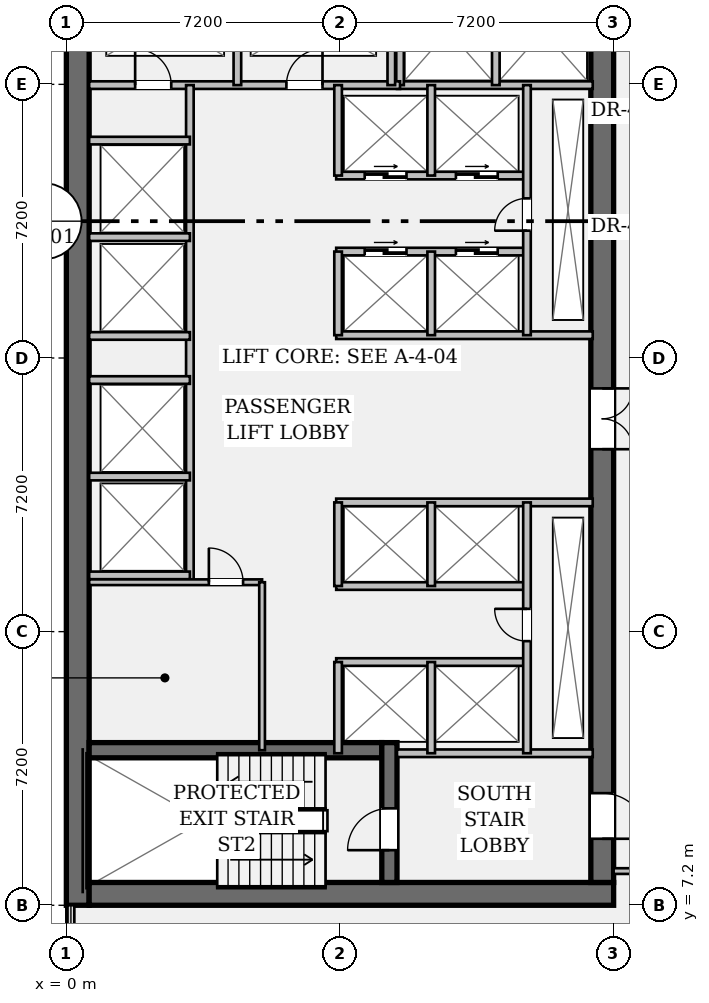
"""IFC4 building model, lengths in metres.
Left out: names, types, materials, properties, quantities, classifications, styles, units other than length and angle.
Written with IfcOpenShell. Run it as: python <this file> out.ifc"""

import sys

from ifc_helpers import new_model, si_unit, direction, frame, frame_2d, origin, place, context, subcontext, project, spatial, rectangle, extrude, element, fill, save


model = new_model("IFC4")
c1 = context("Model", 3, precision=1e-05, world=origin(), true_north=direction((0.0, 1.0)))
c2 = subcontext(c1, "Body", "Model", "MODEL_VIEW")
j1 = project(units=[si_unit("LENGTHUNIT", "METRE"), si_unit("PLANEANGLEUNIT", "RADIAN")], contexts=[c1])
p1 = place(None, origin())
s1 = spatial("IfcSite", under=j1, at=p1, CompositionType="ELEMENT")
p2 = place(p1, origin())
s2 = spatial("IfcBuilding", under=s1, at=p2, CompositionType="ELEMENT")
p3 = place(p2, frame((0.0, 0.0, 58.1)))
s3 = spatial("IfcBuildingStorey", under=s2, at=p3, CompositionType="ELEMENT", Elevation=58.1)
p4 = place(p3, frame((0.3, 7.2, 0.0), z_axis=(0.0, 0.0, 1.0), x_axis=(0.0, 1.0, 0.0)))
e1 = element("IfcWall", 1, at=p4, inside=s3, PredefinedType="SHEAR", context=c2, shape_type="SweptSolid", body=[
    extrude(rectangle(XDim=28.8, YDim=0.6, at=frame_2d((14.4, 0.0))), origin(), (0.0, 0.0, 1.0), 3.57),
])
p5 = place(p3, frame((0.6, 7.5, 0.0), z_axis=(0.0, 0.0, 1.0), x_axis=(1.0, 0.0, 0.0)))
e2 = element("IfcWall", 2, at=p5, inside=s3, PredefinedType="SHEAR", context=c2, shape_type="SweptSolid", body=[
    extrude(rectangle(XDim=13.8, YDim=0.6, at=frame_2d((6.9, 0.0))), origin(), (0.0, 0.0, 1.0), 3.57),
])
p6 = place(p3, frame((14.1, 35.4, 0.0), z_axis=(0.0, 0.0, 1.0), x_axis=(0.0, -1.0, 0.0)))
e3 = element("IfcWall", 3, at=p6, inside=s3, PredefinedType="SHEAR", context=c2, shape_type="SweptSolid", body=[
    extrude(rectangle(XDim=27.6, YDim=0.6, at=frame_2d((13.8, 0.0))), origin(), (0.0, 0.0, 1.0), 3.57),
])
p7 = place(p6, frame((1.3, 0.0, 0.0)))
e4 = element("IfcOpeningElement", 4, at=p7, cuts=e3, PredefinedType="OPENING", context=c2, shape_type="SweptSolid", body=[
    extrude(rectangle(XDim=1.2, YDim=2.15, at=frame_2d((0.6, 1.075))), frame((0.0, 0.312, 0.0), z_axis=(0.0, -1.0, 0.0), x_axis=(1.0, 0.0, 0.0)), (0.0, 0.0, 1.0), 0.624),
])
p8 = place(p6, frame((25.25, 0.0, 0.0)))
e5 = element("IfcOpeningElement", 5, at=p8, cuts=e3, PredefinedType="OPENING", context=c2, shape_type="SweptSolid", body=[
    extrude(rectangle(XDim=1.2, YDim=2.15, at=frame_2d((0.6, 1.075))), frame((0.0, 0.312, 0.0), z_axis=(0.0, -1.0, 0.0), x_axis=(1.0, 0.0, 0.0)), (0.0, 0.0, 1.0), 0.624),
])
p9 = place(p6, frame((14.6, 0.0, 0.0)))
e6 = element("IfcOpeningElement", 6, at=p9, cuts=e3, PredefinedType="OPENING", context=c2, shape_type="SweptSolid", body=[
    extrude(rectangle(XDim=1.6, YDim=2.2, at=frame_2d((0.8, 1.1))), frame((0.0, 0.312, 0.0), z_axis=(0.0, -1.0, 0.0), x_axis=(1.0, 0.0, 0.0)), (0.0, 0.0, 1.0), 0.624),
])
p10 = place(p3, frame((0.6, 11.28, 0.0), z_axis=(0.0, 0.0, 1.0), x_axis=(1.0, 0.0, 0.0)))
e7 = element("IfcWall", 7, at=p10, inside=s3, PredefinedType="SHEAR", context=c2, shape_type="SweptSolid", body=[
    extrude(rectangle(XDim=7.7, YDim=0.4, at=frame_2d((3.85, 0.0))), origin(), (0.0, 0.0, 1.0), 3.57),
])
p11 = place(p3, frame((8.5, 7.8, 0.0), z_axis=(0.0, 0.0, 1.0), x_axis=(0.0, 1.0, 0.0)))
e8 = element("IfcWall", 8, at=p11, inside=s3, PredefinedType="SHEAR", context=c2, shape_type="SweptSolid", body=[
    extrude(rectangle(XDim=3.68, YDim=0.4, at=frame_2d((1.84, 0.0))), origin(), (0.0, 0.0, 1.0), 3.57),
])
p12 = place(p11, frame((0.85, 0.0, 0.0)))
e9 = element("IfcOpeningElement", 9, at=p12, cuts=e8, PredefinedType="OPENING", context=c2, shape_type="SweptSolid", body=[
    extrude(rectangle(XDim=1.1, YDim=2.15, at=frame_2d((0.55, 1.075))), frame((0.0, 0.212, 0.0), z_axis=(0.0, -1.0, 0.0), x_axis=(1.0, 0.0, 0.0)), (0.0, 0.0, 1.0), 0.424),
])
for number, where, z_axis, x_axis in (
    (10, (8.7, 11.2, 0.0), (0.0, 0.0, 1.0), (1.0, 0.0, 0.0)),
    (11, (8.7, 28.78, 0.0), (0.0, 0.0, 1.0), (1.0, 0.0, 0.0)),
):
    element("IfcWall", number, at=place(p3, frame(where, z_axis=z_axis, x_axis=x_axis)), inside=s3, PredefinedType="PARTITIONING", context=c2, shape_type="SweptSolid", body=[
        extrude(rectangle(XDim=5.15, YDim=0.2, at=frame_2d((2.575, 0.0))), origin(), (0.0, 0.0, 1.0), 3.57),
    ])
for number, where, z_axis, x_axis in (
    (12, (8.78, 28.78, 0.0), (0.0, 0.0, 1.0), (0.0, 1.0, 0.0)),
    (13, (11.3, 28.78, 0.0), (0.0, 0.0, 1.0), (0.0, 1.0, 0.0)),
):
    element("IfcWall", number, at=place(p3, frame(where, z_axis=z_axis, x_axis=x_axis)), inside=s3, PredefinedType="PARTITIONING", context=c2, shape_type="SweptSolid", body=[
        extrude(rectangle(XDim=3.1, YDim=0.2, at=frame_2d((1.55, 0.0))), origin(), (0.0, 0.0, 1.0), 3.57),
    ])
p13 = place(p3, frame((0.6, 28.78, 0.0), z_axis=(0.0, 0.0, 1.0), x_axis=(1.0, 0.0, 0.0)))
e14 = element("IfcWall", 14, at=p13, inside=s3, PredefinedType="PARTITIONING", context=c2, shape_type="SweptSolid", body=[
    extrude(rectangle(XDim=8.18, YDim=0.2, at=frame_2d((4.09, 0.0))), origin(), (0.0, 0.0, 1.0), 3.57),
])
p14 = place(p13, frame((1.21, 0.0, 0.0)))
e15 = element("IfcOpeningElement", 15, at=p14, cuts=e14, PredefinedType="OPENING", context=c2, shape_type="SweptSolid", body=[
    extrude(rectangle(XDim=0.95, YDim=2.15, at=frame_2d((0.475, 1.075))), frame((0.0, 0.112, 0.0), z_axis=(0.0, -1.0, 0.0), x_axis=(1.0, 0.0, 0.0)), (0.0, 0.0, 1.0), 0.224),
])
p15 = place(p13, frame((5.19, 0.0, 0.0)))
e16 = element("IfcOpeningElement", 16, at=p15, cuts=e14, PredefinedType="OPENING", context=c2, shape_type="SweptSolid", body=[
    extrude(rectangle(XDim=0.95, YDim=2.15, at=frame_2d((0.475, 1.075))), frame((0.0, 0.112, 0.0), z_axis=(0.0, -1.0, 0.0), x_axis=(1.0, 0.0, 0.0)), (0.0, 0.0, 1.0), 0.224),
])
for number, where, z_axis, x_axis in (
    (17, (4.5, 28.78, 0.0), (0.0, 0.0, 1.0), (0.0, 1.0, 0.0)),
    (18, (8.55, 28.78, 0.0), (0.0, 0.0, 1.0), (0.0, 1.0, 0.0)),
):
    element("IfcWall", number, at=place(p3, frame(where, z_axis=z_axis, x_axis=x_axis)), inside=s3, PredefinedType="PARTITIONING", context=c2, shape_type="SweptSolid", body=[
        extrude(rectangle(XDim=2.94, YDim=0.2, at=frame_2d((1.47, 0.0))), origin(), (0.0, 0.0, 1.0), 3.57),
    ])
p16 = place(p3, frame((3.25, 15.7, 0.0), z_axis=(0.0, 0.0, 1.0), x_axis=(0.0, 1.0, 0.0)))
e19 = element("IfcWall", 19, at=p16, inside=s3, PredefinedType="PARTITIONING", context=c2, shape_type="SweptSolid", body=[
    extrude(rectangle(XDim=13.08, YDim=0.2, at=frame_2d((6.54, 0.0))), origin(), (0.0, 0.0, 1.0), 3.57),
])
for number, where, z_axis, x_axis in (
    (20, (0.6, 15.88, 0.0), (0.0, 0.0, 1.0), (1.0, 0.0, 0.0)),
    (21, (0.6, 18.48, 0.0), (0.0, 0.0, 1.0), (1.0, 0.0, 0.0)),
    (22, (0.6, 22.18, 0.0), (0.0, 0.0, 1.0), (1.0, 0.0, 0.0)),
    (23, (0.6, 24.78, 0.0), (0.0, 0.0, 1.0), (1.0, 0.0, 0.0)),
    (24, (0.6, 21.02, 0.0), (0.0, 0.0, 1.0), (1.0, 0.0, 0.0)),
    (25, (0.6, 27.32, 0.0), (0.0, 0.0, 1.0), (1.0, 0.0, 0.0)),
):
    element("IfcWall", number, at=place(p3, frame(where, z_axis=z_axis, x_axis=x_axis)), inside=s3, PredefinedType="PARTITIONING", context=c2, shape_type="SweptSolid", body=[
        extrude(rectangle(XDim=2.65, YDim=0.2, at=frame_2d((1.325, 0.0))), origin(), (0.0, 0.0, 1.0), 3.57),
    ])
p17 = place(p3, frame((7.1, 22.2, 0.0), z_axis=(0.0, 0.0, 1.0), x_axis=(1.0, 0.0, 0.0)))
e26 = element("IfcWall", 26, at=p17, inside=s3, PredefinedType="PARTITIONING", context=c2, shape_type="SweptSolid", body=[
    extrude(rectangle(XDim=6.75, YDim=0.2, at=frame_2d((3.375, 0.0))), origin(), (0.0, 0.0, 1.0), 3.57),
])
p18 = place(p3, frame((7.1, 24.4, 0.0), z_axis=(0.0, 0.0, 1.0), x_axis=(1.0, 0.0, 0.0)))
e27 = element("IfcWall", 27, at=p18, inside=s3, PredefinedType="PARTITIONING", context=c2, shape_type="SweptSolid", body=[
    extrude(rectangle(XDim=5.02, YDim=0.2, at=frame_2d((2.51, 0.0))), origin(), (0.0, 0.0, 1.0), 3.57),
])
p19 = place(p18, frame((0.75, 0.0, 0.0)))
e28 = element("IfcOpeningElement", 28, at=p19, cuts=e27, PredefinedType="OPENING", context=c2, shape_type="SweptSolid", body=[
    extrude(rectangle(XDim=1.1, YDim=2.2, at=frame_2d((0.55, 1.1))), frame((0.0, 0.112, 0.0), z_axis=(0.0, -1.0, 0.0), x_axis=(1.0, 0.0, 0.0)), (0.0, 0.0, 1.0), 0.224),
])
p20 = place(p18, frame((3.15, 0.0, 0.0)))
e29 = element("IfcOpeningElement", 29, at=p20, cuts=e27, PredefinedType="OPENING", context=c2, shape_type="SweptSolid", body=[
    extrude(rectangle(XDim=1.1, YDim=2.2, at=frame_2d((0.55, 1.1))), frame((0.0, 0.112, 0.0), z_axis=(0.0, -1.0, 0.0), x_axis=(1.0, 0.0, 0.0)), (0.0, 0.0, 1.0), 0.224),
])
p21 = place(p3, frame((7.1, 26.4, 0.0), z_axis=(0.0, 0.0, 1.0), x_axis=(1.0, 0.0, 0.0)))
e30 = element("IfcWall", 30, at=p21, inside=s3, PredefinedType="PARTITIONING", context=c2, shape_type="SweptSolid", body=[
    extrude(rectangle(XDim=5.02, YDim=0.2, at=frame_2d((2.51, 0.0))), origin(), (0.0, 0.0, 1.0), 3.57),
])
p22 = place(p21, frame((0.75, 0.0, 0.0)))
e31 = element("IfcOpeningElement", 31, at=p22, cuts=e30, PredefinedType="OPENING", context=c2, shape_type="SweptSolid", body=[
    extrude(rectangle(XDim=1.1, YDim=2.2, at=frame_2d((0.55, 1.1))), frame((0.0, 0.112, 0.0), z_axis=(0.0, -1.0, 0.0), x_axis=(1.0, 0.0, 0.0)), (0.0, 0.0, 1.0), 0.224),
])
p23 = place(p21, frame((3.15, 0.0, 0.0)))
e32 = element("IfcOpeningElement", 32, at=p23, cuts=e30, PredefinedType="OPENING", context=c2, shape_type="SweptSolid", body=[
    extrude(rectangle(XDim=1.1, YDim=2.2, at=frame_2d((0.55, 1.1))), frame((0.0, 0.112, 0.0), z_axis=(0.0, -1.0, 0.0), x_axis=(1.0, 0.0, 0.0)), (0.0, 0.0, 1.0), 0.224),
])
p24 = place(p3, frame((7.15, 22.2, 0.0), z_axis=(0.0, 0.0, 1.0), x_axis=(0.0, 1.0, 0.0)))
e33 = element("IfcWall", 33, at=p24, inside=s3, PredefinedType="PARTITIONING", context=c2, shape_type="SweptSolid", body=[
    extrude(rectangle(XDim=2.2, YDim=0.2, at=frame_2d((1.1, 0.0))), origin(), (0.0, 0.0, 1.0), 3.57),
])
p25 = place(p3, frame((7.15, 26.4, 0.0), z_axis=(0.0, 0.0, 1.0), x_axis=(0.0, 1.0, 0.0)))
e34 = element("IfcWall", 34, at=p25, inside=s3, PredefinedType="PARTITIONING", context=c2, shape_type="SweptSolid", body=[
    extrude(rectangle(XDim=2.38, YDim=0.2, at=frame_2d((1.19, 0.0))), origin(), (0.0, 0.0, 1.0), 3.57),
])
p26 = place(p3, frame((9.6, 22.2, 0.0), z_axis=(0.0, 0.0, 1.0), x_axis=(0.0, 1.0, 0.0)))
e35 = element("IfcWall", 35, at=p26, inside=s3, PredefinedType="PARTITIONING", context=c2, shape_type="SweptSolid", body=[
    extrude(rectangle(XDim=2.2, YDim=0.2, at=frame_2d((1.1, 0.0))), origin(), (0.0, 0.0, 1.0), 3.57),
])
p27 = place(p3, frame((9.6, 26.4, 0.0), z_axis=(0.0, 0.0, 1.0), x_axis=(0.0, 1.0, 0.0)))
e36 = element("IfcWall", 36, at=p27, inside=s3, PredefinedType="PARTITIONING", context=c2, shape_type="SweptSolid", body=[
    extrude(rectangle(XDim=2.38, YDim=0.2, at=frame_2d((1.19, 0.0))), origin(), (0.0, 0.0, 1.0), 3.57),
])
p28 = place(p3, frame((12.12, 22.2, 0.0), z_axis=(0.0, 0.0, 1.0), x_axis=(0.0, 1.0, 0.0)))
e37 = element("IfcWall", 37, at=p28, inside=s3, PredefinedType="PARTITIONING", context=c2, shape_type="SweptSolid", body=[
    extrude(rectangle(XDim=6.58, YDim=0.2, at=frame_2d((3.29, 0.0))), origin(), (0.0, 0.0, 1.0), 3.57),
])
p29 = place(p28, frame((2.75, 0.0, 0.0)))
e38 = element("IfcOpeningElement", 38, at=p29, cuts=e37, PredefinedType="OPENING", context=c2, shape_type="SweptSolid", body=[
    extrude(rectangle(XDim=0.85, YDim=2.15, at=frame_2d((0.425, 1.075))), frame((0.0, 0.112, 0.0), z_axis=(0.0, -1.0, 0.0), x_axis=(1.0, 0.0, 0.0)), (0.0, 0.0, 1.0), 0.224),
])
p30 = place(p3, frame((7.1, 17.8, 0.0), z_axis=(0.0, 0.0, 1.0), x_axis=(1.0, 0.0, 0.0)))
e39 = element("IfcWall", 39, at=p30, inside=s3, PredefinedType="PARTITIONING", context=c2, shape_type="SweptSolid", body=[
    extrude(rectangle(XDim=6.75, YDim=0.2, at=frame_2d((3.375, 0.0))), origin(), (0.0, 0.0, 1.0), 3.57),
])
for number, where, z_axis, x_axis in (
    (40, (7.1, 15.6, 0.0), (0.0, 0.0, 1.0), (1.0, 0.0, 0.0)),
    (41, (7.1, 13.6, 0.0), (0.0, 0.0, 1.0), (1.0, 0.0, 0.0)),
):
    element("IfcWall", number, at=place(p3, frame(where, z_axis=z_axis, x_axis=x_axis)), inside=s3, PredefinedType="PARTITIONING", context=c2, shape_type="SweptSolid", body=[
        extrude(rectangle(XDim=5.02, YDim=0.2, at=frame_2d((2.51, 0.0))), origin(), (0.0, 0.0, 1.0), 3.57),
    ])
p31 = place(p3, frame((7.15, 15.6, 0.0), z_axis=(0.0, 0.0, 1.0), x_axis=(0.0, 1.0, 0.0)))
e42 = element("IfcWall", 42, at=p31, inside=s3, PredefinedType="PARTITIONING", context=c2, shape_type="SweptSolid", body=[
    extrude(rectangle(XDim=2.2, YDim=0.2, at=frame_2d((1.1, 0.0))), origin(), (0.0, 0.0, 1.0), 3.57),
])
p32 = place(p3, frame((7.15, 11.2, 0.0), z_axis=(0.0, 0.0, 1.0), x_axis=(0.0, 1.0, 0.0)))
e43 = element("IfcWall", 43, at=p32, inside=s3, PredefinedType="PARTITIONING", context=c2, shape_type="SweptSolid", body=[
    extrude(rectangle(XDim=2.4, YDim=0.2, at=frame_2d((1.2, 0.0))), origin(), (0.0, 0.0, 1.0), 3.57),
])
p33 = place(p3, frame((9.6, 15.6, 0.0), z_axis=(0.0, 0.0, 1.0), x_axis=(0.0, 1.0, 0.0)))
e44 = element("IfcWall", 44, at=p33, inside=s3, PredefinedType="PARTITIONING", context=c2, shape_type="SweptSolid", body=[
    extrude(rectangle(XDim=2.2, YDim=0.2, at=frame_2d((1.1, 0.0))), origin(), (0.0, 0.0, 1.0), 3.57),
])
p34 = place(p3, frame((9.6, 11.2, 0.0), z_axis=(0.0, 0.0, 1.0), x_axis=(0.0, 1.0, 0.0)))
e45 = element("IfcWall", 45, at=p34, inside=s3, PredefinedType="PARTITIONING", context=c2, shape_type="SweptSolid", body=[
    extrude(rectangle(XDim=2.4, YDim=0.2, at=frame_2d((1.2, 0.0))), origin(), (0.0, 0.0, 1.0), 3.57),
])
p35 = place(p3, frame((12.12, 11.2, 0.0), z_axis=(0.0, 0.0, 1.0), x_axis=(0.0, 1.0, 0.0)))
e46 = element("IfcWall", 46, at=p35, inside=s3, PredefinedType="PARTITIONING", context=c2, shape_type="SweptSolid", body=[
    extrude(rectangle(XDim=6.6, YDim=0.2, at=frame_2d((3.3, 0.0))), origin(), (0.0, 0.0, 1.0), 3.57),
])
p36 = place(p35, frame((2.95, 0.0, 0.0)))
e47 = element("IfcOpeningElement", 47, at=p36, cuts=e46, PredefinedType="OPENING", context=c2, shape_type="SweptSolid", body=[
    extrude(rectangle(XDim=0.85, YDim=2.15, at=frame_2d((0.425, 1.075))), frame((0.0, 0.112, 0.0), z_axis=(0.0, -1.0, 0.0), x_axis=(1.0, 0.0, 0.0)), (0.0, 0.0, 1.0), 0.224),
])
p37 = place(p3, frame((0.6, 15.7, 0.0), z_axis=(0.0, 0.0, 1.0), x_axis=(1.0, 0.0, 0.0)))
e48 = element("IfcWall", 48, at=p37, inside=s3, PredefinedType="PARTITIONING", context=c2, shape_type="SweptSolid", body=[
    extrude(rectangle(XDim=4.55, YDim=0.15, at=frame_2d((2.275, 0.0))), origin(), (0.0, 0.0, 1.0), 3.57),
])
p38 = place(p37, frame((3.15, 0.0, 0.0)))
e49 = element("IfcOpeningElement", 49, at=p38, cuts=e48, PredefinedType="OPENING", context=c2, shape_type="SweptSolid", body=[
    extrude(rectangle(XDim=0.9, YDim=2.15, at=frame_2d((0.45, 1.075))), frame((0.0, 0.087, 0.0), z_axis=(0.0, -1.0, 0.0), x_axis=(1.0, 0.0, 0.0)), (0.0, 0.0, 1.0), 0.174),
])
p39 = place(p3, frame((5.15, 11.28, 0.0), z_axis=(0.0, 0.0, 1.0), x_axis=(0.0, 1.0, 0.0)))
e50 = element("IfcWall", 50, at=p39, inside=s3, PredefinedType="PARTITIONING", context=c2, shape_type="SweptSolid", body=[
    extrude(rectangle(XDim=4.42, YDim=0.15, at=frame_2d((2.21, 0.0))), origin(), (0.0, 0.0, 1.0), 3.57),
])
p40 = place(p3, frame((14.4, 8.1, 0.0), z_axis=(0.0, 0.0, 1.0), x_axis=(1.0, 0.0, 0.0)))
e51 = element("IfcWall", 51, at=p40, inside=s3, PredefinedType="PARTITIONING", context=c2, shape_type="SweptSolid", body=[
    extrude(rectangle(XDim=2.95, YDim=0.15, at=frame_2d((1.475, 0.0))), origin(), (0.0, 0.0, 1.0), 3.088),
])
p41 = place(p40, frame((0.95, 0.0, 0.0)))
e52 = element("IfcOpeningElement", 52, at=p41, cuts=e51, PredefinedType="OPENING", context=c2, shape_type="SweptSolid", body=[
    extrude(rectangle(XDim=0.95, YDim=2.15, at=frame_2d((0.475, 1.075))), frame((0.0, 0.087, 0.0), z_axis=(0.0, -1.0, 0.0), x_axis=(1.0, 0.0, 0.0)), (0.0, 0.0, 1.0), 0.174),
])
p42 = place(p12, origin())
e53 = element("IfcDoor", 53, at=p42, inside=s3, OperationType="SINGLE_SWING_LEFT", PredefinedType="DOOR", context=c2, shape_type="SweptSolid", body=[
    extrude(rectangle(XDim=1.1, YDim=2.15, at=frame_2d((0.55, 1.075))), frame((0.0, 0.025, 0.0), z_axis=(0.0, -1.0, 0.0), x_axis=(1.0, 0.0, 0.0)), (0.0, 0.0, 1.0), 0.05),
])
fill(e9, e53)
p43 = place(p8, origin())
e54 = element("IfcDoor", 54, at=p43, inside=s3, OperationType="SINGLE_SWING_RIGHT", PredefinedType="DOOR", context=c2, shape_type="SweptSolid", body=[
    extrude(rectangle(XDim=1.2, YDim=2.15, at=frame_2d((0.6, 1.075))), frame((0.0, 0.025, 0.0), z_axis=(0.0, -1.0, 0.0), x_axis=(1.0, 0.0, 0.0)), (0.0, 0.0, 1.0), 0.05),
])
fill(e5, e54)
p44 = place(p14, origin())
e55 = element("IfcDoor", 55, at=p44, inside=s3, OperationType="SINGLE_SWING_LEFT", PredefinedType="DOOR", context=c2, shape_type="SweptSolid", body=[
    extrude(rectangle(XDim=0.95, YDim=2.15, at=frame_2d((0.475, 1.075))), frame((0.0, 0.025, 0.0), z_axis=(0.0, -1.0, 0.0), x_axis=(1.0, 0.0, 0.0)), (0.0, 0.0, 1.0), 0.05),
])
fill(e15, e55)
p45 = place(p15, origin())
e56 = element("IfcDoor", 56, at=p45, inside=s3, OperationType="SINGLE_SWING_RIGHT", PredefinedType="DOOR", context=c2, shape_type="SweptSolid", body=[
    extrude(rectangle(XDim=0.95, YDim=2.15, at=frame_2d((0.475, 1.075))), frame((0.0, 0.025, 0.0), z_axis=(0.0, -1.0, 0.0), x_axis=(1.0, 0.0, 0.0)), (0.0, 0.0, 1.0), 0.05),
])
fill(e16, e56)
p46 = place(p9, origin())
e57 = element("IfcDoor", 57, at=p46, inside=s3, OperationType="DOUBLE_DOOR_SINGLE_SWING", PredefinedType="DOOR", context=c2, shape_type="SweptSolid", body=[
    extrude(rectangle(XDim=1.6, YDim=2.2, at=frame_2d((0.8, 1.1))), frame((0.0, 0.025, 0.0), z_axis=(0.0, -1.0, 0.0), x_axis=(1.0, 0.0, 0.0)), (0.0, 0.0, 1.0), 0.05),
])
fill(e6, e57)
p47 = place(p29, origin())
e58 = element("IfcDoor", 58, at=p47, inside=s3, OperationType="SINGLE_SWING_LEFT", PredefinedType="DOOR", context=c2, shape_type="SweptSolid", body=[
    extrude(rectangle(XDim=0.85, YDim=2.15, at=frame_2d((0.425, 1.075))), frame((0.0, 0.025, 0.0), z_axis=(0.0, -1.0, 0.0), x_axis=(1.0, 0.0, 0.0)), (0.0, 0.0, 1.0), 0.05),
])
fill(e38, e58)
p48 = place(p19, origin())
e59 = element("IfcDoor", 59, at=p48, inside=s3, OperationType="DOUBLE_DOOR_SLIDING", PredefinedType="DOOR", context=c2, shape_type="SweptSolid", body=[
    extrude(rectangle(XDim=1.1, YDim=2.2, at=frame_2d((0.55, 1.1))), frame((0.0, 0.025, 0.0), z_axis=(0.0, -1.0, 0.0), x_axis=(1.0, 0.0, 0.0)), (0.0, 0.0, 1.0), 0.05),
])
fill(e28, e59)
p49 = place(p20, origin())
e60 = element("IfcDoor", 60, at=p49, inside=s3, OperationType="DOUBLE_DOOR_SLIDING", PredefinedType="DOOR", context=c2, shape_type="SweptSolid", body=[
    extrude(rectangle(XDim=1.1, YDim=2.2, at=frame_2d((0.55, 1.1))), frame((0.0, 0.025, 0.0), z_axis=(0.0, -1.0, 0.0), x_axis=(1.0, 0.0, 0.0)), (0.0, 0.0, 1.0), 0.05),
])
fill(e29, e60)
p50 = place(p22, origin())
e61 = element("IfcDoor", 61, at=p50, inside=s3, OperationType="DOUBLE_DOOR_SLIDING", PredefinedType="DOOR", context=c2, shape_type="SweptSolid", body=[
    extrude(rectangle(XDim=1.1, YDim=2.2, at=frame_2d((0.55, 1.1))), frame((0.0, 0.025, 0.0), z_axis=(0.0, -1.0, 0.0), x_axis=(1.0, 0.0, 0.0)), (0.0, 0.0, 1.0), 0.05),
])
fill(e31, e61)
p51 = place(p23, origin())
e62 = element("IfcDoor", 62, at=p51, inside=s3, OperationType="DOUBLE_DOOR_SLIDING", PredefinedType="DOOR", context=c2, shape_type="SweptSolid", body=[
    extrude(rectangle(XDim=1.1, YDim=2.2, at=frame_2d((0.55, 1.1))), frame((0.0, 0.025, 0.0), z_axis=(0.0, -1.0, 0.0), x_axis=(1.0, 0.0, 0.0)), (0.0, 0.0, 1.0), 0.05),
])
fill(e32, e62)
p52 = place(p36, origin())
e63 = element("IfcDoor", 63, at=p52, inside=s3, OperationType="SINGLE_SWING_RIGHT", PredefinedType="DOOR", context=c2, shape_type="SweptSolid", body=[
    extrude(rectangle(XDim=0.85, YDim=2.15, at=frame_2d((0.425, 1.075))), frame((0.0, 0.025, 0.0), z_axis=(0.0, -1.0, 0.0), x_axis=(1.0, 0.0, 0.0)), (0.0, 0.0, 1.0), 0.05),
])
fill(e47, e63)
p53 = place(p38, origin())
e64 = element("IfcDoor", 64, at=p53, inside=s3, OperationType="SINGLE_SWING_LEFT", PredefinedType="DOOR", context=c2, shape_type="SweptSolid", body=[
    extrude(rectangle(XDim=0.9, YDim=2.15, at=frame_2d((0.45, 1.075))), frame((0.0, 0.025, 0.0), z_axis=(0.0, -1.0, 0.0), x_axis=(1.0, 0.0, 0.0)), (0.0, 0.0, 1.0), 0.05),
])
fill(e49, e64)
save(model, sys.argv[1])
